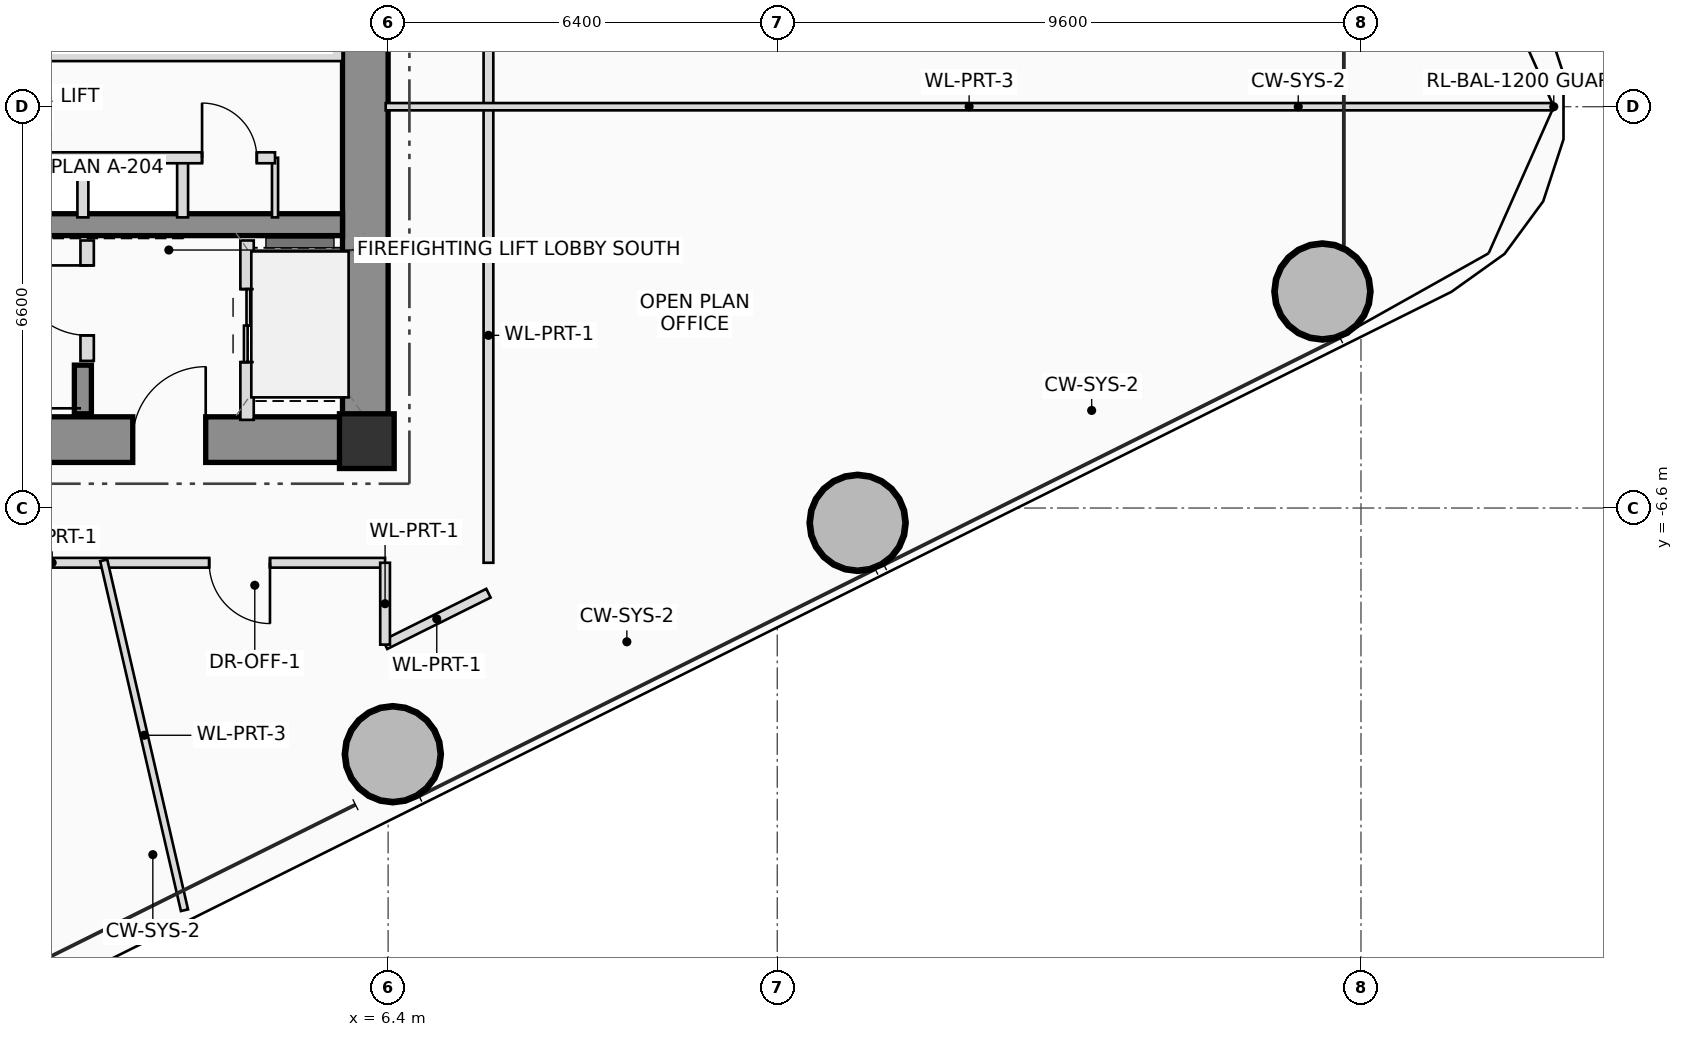
"""IFC4 building model, lengths in metres.
Left out: names, types, materials, properties, quantities, classifications, styles, units other than length and angle.
Written with IfcOpenShell. Run it as: python <this file> out.ifc"""

import sys

from ifc_helpers import new_model, si_unit, direction, frame, frame_2d, origin, origin_2d, place, context, subcontext, project, spatial, rectangle, hollow_circle, extrude, source, transform, mapped, element, fill, save


model = new_model("IFC4")
c1 = context("Model", 3, precision=1e-05, world=origin(), true_north=direction((0.0, 1.0)))
c2 = subcontext(c1, "Body", "Model", "MODEL_VIEW")
j1 = project(units=[si_unit("LENGTHUNIT", "METRE"), si_unit("PLANEANGLEUNIT", "RADIAN")], contexts=[c1])
p1 = place(None, origin())
s1 = spatial("IfcSite", under=j1, at=p1, CompositionType="ELEMENT")
p2 = place(p1, origin())
s2 = spatial("IfcBuilding", under=s1, at=p2, CompositionType="ELEMENT")
p3 = place(p2, frame((0.0, 0.0, 23.8)))
s3 = spatial("IfcBuildingStorey", under=s2, at=p3, CompositionType="ELEMENT", Elevation=23.8)
m1 = source(origin(), c2, "Body", "SweptSolid", [
    extrude(rectangle(XDim=0.9, YDim=0.9, at=origin_2d()), origin(), (0.0, 0.0, 1.0), 3.7),
])
p4 = place(p3, frame((6.05, -5.5, 0.0), z_axis=(0.0, 0.0, 1.0), x_axis=(1.0, 0.0, 0.0)))
e1 = element("IfcColumn", 1, at=p4, inside=s3, PredefinedType="COLUMN", context=c2, shape_type="MappedRepresentation", body=[
    mapped(m1, transform((0.0, 0.0, 0.0), scale=1.0)),
])
p5 = place(p3, frame((-6.4, -5.475, 0.0), z_axis=(0.0, 0.0, 1.0), x_axis=(1.0, 0.0, 0.0)))
e2 = element("IfcWall", 2, at=p5, inside=s3, PredefinedType="SHEAR", context=c2, shape_type="SweptSolid", body=[
    extrude(rectangle(XDim=12.8, YDim=0.75, at=frame_2d((6.4, 0.0))), origin(), (0.0, 0.0, 1.0), 3.7),
])
p6 = place(p5, frame((8.6, 0.0, 0.0)))
e3 = element("IfcOpeningElement", 3, at=p6, cuts=e2, PredefinedType="OPENING", context=c2, shape_type="SweptSolid", body=[
    extrude(rectangle(XDim=1.2, YDim=2.2, at=frame_2d((0.6, 1.1))), frame((0.0, 0.385, 0.0), z_axis=(0.0, -1.0, 0.0), x_axis=(1.0, 0.0, 0.0)), (0.0, 0.0, 1.0), 0.77),
])
p7 = place(p3, frame((6.025, -5.1, 0.0), z_axis=(0.0, 0.0, 1.0), x_axis=(0.0, 1.0, 0.0)))
e4 = element("IfcWall", 4, at=p7, inside=s3, PredefinedType="SHEAR", context=c2, shape_type="SweptSolid", body=[
    extrude(rectangle(XDim=10.2, YDim=0.75, at=frame_2d((5.1, 0.0))), origin(), (0.0, 0.0, 1.0), 3.7),
])
p8 = place(p3, frame((-5.65, -1.94, 0.0), z_axis=(0.0, 0.0, 1.0), x_axis=(1.0, 0.0, 0.0)))
e5 = element("IfcWall", 5, at=p8, inside=s3, PredefinedType="SHEAR", context=c2, shape_type="SweptSolid", body=[
    extrude(rectangle(XDim=11.3, YDim=0.36, at=frame_2d((5.65, 0.0))), origin(), (0.0, 0.0, 1.0), 3.7),
])
p9 = place(p3, frame((1.38, -5.05, 0.0), z_axis=(0.0, 0.0, 1.0), x_axis=(0.0, 1.0, 0.0)))
e6 = element("IfcWall", 6, at=p9, inside=s3, PredefinedType="SHEAR", context=c2, shape_type="SweptSolid", body=[
    extrude(rectangle(XDim=0.8, YDim=0.28, at=frame_2d((0.4, 0.0))), origin(), (0.0, 0.0, 1.0), 3.7),
])
m2 = source(origin(), c2, "Body", "SweptSolid", [
    extrude(hollow_circle(Radius=0.8, WallThickness=0.055, at=origin_2d()), origin(), (0.0, 0.0, 1.0), 3.7),
])
for number, where, z_axis, x_axis in (
    (7, (6.477, -10.648, 0.0), (0.0, 0.0, 1.0), (1.0, 0.0, 0.0)),
    (8, (14.122, -6.844, 0.0), (0.0, 0.0, 1.0), (1.0, 0.0, 0.0)),
    (9, (21.766, -3.039, 0.0), (0.0, 0.0, 1.0), (1.0, 0.0, 0.0)),
):
    element("IfcColumn", number, at=place(p3, frame(where, z_axis=z_axis, x_axis=x_axis)), inside=s3, PredefinedType="COLUMN", context=c2, shape_type="MappedRepresentation", body=[
        mapped(m2, transform((0.0, 0.0, 0.0), scale=1.0)),
    ])
p10 = place(p3, frame((1.45, -4.18, 0.0), z_axis=(0.0, 0.0, 1.0), x_axis=(0.0, 1.0, 0.0)))
e10 = element("IfcWall", 10, at=p10, inside=s3, PredefinedType="PLUMBINGWALL", context=c2, shape_type="SweptSolid", body=[
    extrude(rectangle(XDim=1.98, YDim=0.22, at=frame_2d((0.99, 0.0))), origin(), (0.0, 0.0, 1.0), 3.495),
])
p11 = place(p10, frame((0.42, 0.0, 0.0)))
e11 = element("IfcOpeningElement", 11, at=p11, cuts=e10, PredefinedType="OPENING", context=c2, shape_type="SweptSolid", body=[
    extrude(rectangle(XDim=1.15, YDim=2.15, at=frame_2d((0.575, 1.075))), frame((0.0, 0.12, 0.0), z_axis=(0.0, -1.0, 0.0), x_axis=(1.0, 0.0, 0.0)), (0.0, 0.0, 1.0), 0.24),
])
p12 = place(p3, frame((4.08, -5.15, 0.0), z_axis=(0.0, 0.0, 1.0), x_axis=(0.0, 1.0, 0.0)))
e12 = element("IfcWall", 12, at=p12, inside=s3, PredefinedType="PLUMBINGWALL", context=c2, shape_type="SweptSolid", body=[
    extrude(rectangle(XDim=2.95, YDim=0.22, at=frame_2d((1.475, 0.0))), origin(), (0.0, 0.0, 1.0), 3.495),
])
p13 = place(p12, frame((0.95, 0.0, 0.0)))
e13 = element("IfcOpeningElement", 13, at=p13, cuts=e12, PredefinedType="OPENING", context=c2, shape_type="SweptSolid", body=[
    extrude(rectangle(XDim=1.2, YDim=2.25, at=frame_2d((0.6, 1.125))), frame((0.0, 0.12, 0.0), z_axis=(0.0, -1.0, 0.0), x_axis=(1.0, 0.0, 0.0)), (0.0, 0.0, 1.0), 0.24),
])
for number, where, z_axis, x_axis in (
    (14, (1.38, 0.84, 0.0), (0.0, 0.0, 1.0), (0.0, 1.0, 0.0)),
    (15, (1.38, -1.82, 0.0), (0.0, 0.0, 1.0), (0.0, 1.0, 0.0)),
    (16, (3.02, 0.84, 0.0), (0.0, 0.0, 1.0), (0.0, 1.0, 0.0)),
    (17, (4.38, 0.84, 0.0), (0.0, 0.0, 1.0), (0.0, 1.0, 0.0)),
    (18, (3.02, -1.82, 0.0), (0.0, 0.0, 1.0), (0.0, 1.0, 0.0)),
):
    element("IfcWall", number, at=place(p3, frame(where, z_axis=z_axis, x_axis=x_axis)), inside=s3, PredefinedType="PLUMBINGWALL", context=c2, shape_type="SweptSolid", body=[
        extrude(rectangle(XDim=0.98, YDim=0.18, at=frame_2d((0.49, 0.0))), origin(), (0.0, 0.0, 1.0), 3.495),
    ])
p14 = place(p3, frame((4.54, -1.82, 0.0), z_axis=(0.0, 0.0, 1.0), x_axis=(0.0, 1.0, 0.0)))
e19 = element("IfcWall", 19, at=p14, inside=s3, PredefinedType="PARTITIONING", context=c2, shape_type="SweptSolid", body=[
    extrude(rectangle(XDim=0.98, YDim=0.1, at=frame_2d((0.49, 0.0))), origin(), (0.0, 0.0, 1.0), 3.495),
])
p15 = place(p3, frame((-5.68, 0.84, 0.0), z_axis=(0.0, 0.0, 1.0), x_axis=(1.0, 0.0, 0.0)))
e20 = element("IfcWall", 20, at=p15, inside=s3, PredefinedType="PLUMBINGWALL", context=c2, shape_type="SweptSolid", body=[
    extrude(rectangle(XDim=11.33, YDim=0.18, at=frame_2d((5.665, 0.0))), origin(), (0.0, 0.0, 1.0), 3.495),
])
p16 = place(p15, frame((0.43, 0.0, 0.0)))
e21 = element("IfcOpeningElement", 21, at=p16, cuts=e20, PredefinedType="OPENING", context=c2, shape_type="SweptSolid", body=[
    extrude(rectangle(XDim=1.1, YDim=2.2, at=frame_2d((0.55, 1.1))), frame((0.0, 0.1, 0.0), z_axis=(0.0, -1.0, 0.0), x_axis=(1.0, 0.0, 0.0)), (0.0, 0.0, 1.0), 0.2),
])
p17 = place(p15, frame((2.13, 0.0, 0.0)))
e22 = element("IfcOpeningElement", 22, at=p17, cuts=e20, PredefinedType="OPENING", context=c2, shape_type="SweptSolid", body=[
    extrude(rectangle(XDim=1.1, YDim=2.2, at=frame_2d((0.55, 1.1))), frame((0.0, 0.1, 0.0), z_axis=(0.0, -1.0, 0.0), x_axis=(1.0, 0.0, 0.0)), (0.0, 0.0, 1.0), 0.2),
])
p18 = place(p3, frame((-5.68, -0.84, 0.0), z_axis=(0.0, 0.0, 1.0), x_axis=(1.0, 0.0, 0.0)))
e23 = element("IfcWall", 23, at=p18, inside=s3, PredefinedType="PLUMBINGWALL", context=c2, shape_type="SweptSolid", body=[
    extrude(rectangle(XDim=10.22, YDim=0.18, at=frame_2d((5.11, 0.0))), origin(), (0.0, 0.0, 1.0), 3.495),
])
p19 = place(p18, frame((0.43, 0.0, 0.0)))
e24 = element("IfcOpeningElement", 24, at=p19, cuts=e23, PredefinedType="OPENING", context=c2, shape_type="SweptSolid", body=[
    extrude(rectangle(XDim=1.1, YDim=2.2, at=frame_2d((0.55, 1.1))), frame((0.0, 0.1, 0.0), z_axis=(0.0, -1.0, 0.0), x_axis=(1.0, 0.0, 0.0)), (0.0, 0.0, 1.0), 0.2),
])
p20 = place(p18, frame((2.13, 0.0, 0.0)))
e25 = element("IfcOpeningElement", 25, at=p20, cuts=e23, PredefinedType="OPENING", context=c2, shape_type="SweptSolid", body=[
    extrude(rectangle(XDim=1.1, YDim=2.2, at=frame_2d((0.55, 1.1))), frame((0.0, 0.1, 0.0), z_axis=(0.0, -1.0, 0.0), x_axis=(1.0, 0.0, 0.0)), (0.0, 0.0, 1.0), 0.2),
])
p21 = place(p18, frame((9.02, 0.0, 0.0)))
e26 = element("IfcOpeningElement", 26, at=p21, cuts=e23, PredefinedType="OPENING", context=c2, shape_type="SweptSolid", body=[
    extrude(rectangle(XDim=0.9, YDim=2.05, at=frame_2d((0.45, 1.025))), frame((0.0, 0.1, 0.0), z_axis=(0.0, -1.0, 0.0), x_axis=(1.0, 0.0, 0.0)), (0.0, 0.0, 1.0), 0.2),
])
p22 = place(p3, frame((6.35, -7.5, 0.0), z_axis=(0.0, 0.0, 1.0), x_axis=(-1.0, 0.0, 0.0)))
e27 = element("IfcWall", 27, at=p22, inside=s3, PredefinedType="PARTITIONING", context=c2, shape_type="SweptSolid", body=[
    extrude(rectangle(XDim=12.7, YDim=0.16, at=frame_2d((6.35, 0.0))), origin(), (0.0, 0.0, 1.0), 2.8),
])
p23 = place(p22, frame((1.893, 0.0, 0.0)))
e28 = element("IfcOpeningElement", 28, at=p23, cuts=e27, PredefinedType="OPENING", context=c2, shape_type="SweptSolid", body=[
    extrude(rectangle(XDim=1.0, YDim=2.25, at=frame_2d((0.5, 1.125))), frame((0.0, 0.09, 0.0), z_axis=(0.0, -1.0, 0.0), x_axis=(1.0, 0.0, 0.0)), (0.0, 0.0, 1.0), 0.18),
])
p24 = place(p22, frame((8.057, 0.0, 0.0)))
e29 = element("IfcOpeningElement", 29, at=p24, cuts=e27, PredefinedType="OPENING", context=c2, shape_type="SweptSolid", body=[
    extrude(rectangle(XDim=1.0, YDim=2.25, at=frame_2d((0.5, 1.125))), frame((0.0, 0.09, 0.0), z_axis=(0.0, -1.0, 0.0), x_axis=(1.0, 0.0, 0.0)), (0.0, 0.0, 1.0), 0.18),
])
for number, where, z_axis, x_axis in (
    (30, (8.05, 7.5, 0.0), (0.0, 0.0, 1.0), (0.0, -1.0, 0.0)),
    (31, (8.05, -0.02, 0.0), (0.0, 0.0, 1.0), (0.0, -1.0, 0.0)),
):
    element("IfcWall", number, at=place(p3, frame(where, z_axis=z_axis, x_axis=x_axis)), inside=s3, PredefinedType="PARTITIONING", context=c2, shape_type="SweptSolid", body=[
        extrude(rectangle(XDim=7.48, YDim=0.16, at=frame_2d((3.74, 0.0))), origin(), (0.0, 0.0, 1.0), 2.8),
    ])
p25 = place(p3, frame((8.05, -8.0, 0.0), z_axis=(0.0, 0.0, 1.0), x_axis=(-0.895274181873, -0.445515588136, 0.0)))
e32 = element("IfcWall", 32, at=p25, inside=s3, PredefinedType="PARTITIONING", context=c2, shape_type="SweptSolid", body=[
    extrude(rectangle(XDim=1.899, YDim=0.16, at=frame_2d((0.949, 0.0))), origin(), (0.0, 0.0, 1.0), 2.8),
])
p26 = place(p3, frame((6.35, -8.846, 0.0), z_axis=(0.0, 0.0, 1.0), x_axis=(0.0, 1.0, 0.0)))
e33 = element("IfcWall", 33, at=p26, inside=s3, PredefinedType="PARTITIONING", context=c2, shape_type="SweptSolid", body=[
    extrude(rectangle(XDim=1.346, YDim=0.16, at=frame_2d((0.673, 0.0))), origin(), (0.0, 0.0, 1.0), 2.8),
])
p27 = place(p3, frame((6.36, 0.0, 0.0), z_axis=(0.0, 0.0, 1.0), x_axis=(1.0, 0.0, 0.0)))
e34 = element("IfcWall", 34, at=p27, inside=s3, PredefinedType="PARTITIONING", context=c2, shape_type="SweptSolid", body=[
    extrude(rectangle(XDim=19.191, YDim=0.12, at=frame_2d((9.595, 0.0))), origin(), (0.0, 0.0, 1.0), 2.96),
])
p28 = place(p3, frame((1.722, -7.46, 0.0), z_axis=(0.0, 0.0, 1.0), x_axis=(0.22494706926, -0.974370984806, 0.0)))
e35 = element("IfcWall", 35, at=p28, inside=s3, PredefinedType="PARTITIONING", context=c2, shape_type="SweptSolid", body=[
    extrude(rectangle(XDim=5.905, YDim=0.12, at=frame_2d((2.953, 0.0))), origin(), (0.0, 0.0, 1.0), 2.96),
])
p29 = place(p6, origin())
e36 = element("IfcDoor", 36, at=p29, inside=s3, OperationType="SINGLE_SWING_RIGHT", PredefinedType="DOOR", context=c2, shape_type="SweptSolid", body=[
    extrude(rectangle(XDim=1.2, YDim=2.2, at=frame_2d((0.6, 1.1))), frame((0.0, 0.025, 0.0), z_axis=(0.0, -1.0, 0.0), x_axis=(1.0, 0.0, 0.0)), (0.0, 0.0, 1.0), 0.05),
])
fill(e3, e36)
p30 = place(p11, origin())
e37 = element("IfcDoor", 37, at=p30, inside=s3, OperationType="SINGLE_SWING_RIGHT", PredefinedType="DOOR", context=c2, shape_type="SweptSolid", body=[
    extrude(rectangle(XDim=1.15, YDim=2.15, at=frame_2d((0.575, 1.075))), frame((0.0, 0.025, 0.0), z_axis=(0.0, -1.0, 0.0), x_axis=(1.0, 0.0, 0.0)), (0.0, 0.0, 1.0), 0.05),
])
fill(e11, e37)
p31 = place(p13, origin())
e38 = element("IfcDoor", 38, at=p31, inside=s3, OperationType="DOUBLE_DOOR_SLIDING", PredefinedType="DOOR", context=c2, shape_type="SweptSolid", body=[
    extrude(rectangle(XDim=1.2, YDim=2.25, at=frame_2d((0.6, 1.125))), frame((0.0, 0.025, 0.0), z_axis=(0.0, -1.0, 0.0), x_axis=(1.0, 0.0, 0.0)), (0.0, 0.0, 1.0), 0.05),
])
fill(e13, e38)
p32 = place(p21, origin())
e39 = element("IfcDoor", 39, at=p32, inside=s3, OperationType="SINGLE_SWING_LEFT", PredefinedType="DOOR", context=c2, shape_type="SweptSolid", body=[
    extrude(rectangle(XDim=0.9, YDim=2.05, at=frame_2d((0.45, 1.025))), frame((0.0, 0.025, 0.0), z_axis=(0.0, -1.0, 0.0), x_axis=(1.0, 0.0, 0.0)), (0.0, 0.0, 1.0), 0.05),
])
fill(e26, e39)
p33 = place(p23, origin())
e40 = element("IfcDoor", 40, at=p33, inside=s3, OperationType="SINGLE_SWING_LEFT", PredefinedType="DOOR", context=c2, shape_type="SweptSolid", body=[
    extrude(rectangle(XDim=1.0, YDim=2.25, at=frame_2d((0.5, 1.125))), frame((0.0, 0.025, 0.0), z_axis=(0.0, -1.0, 0.0), x_axis=(1.0, 0.0, 0.0)), (0.0, 0.0, 1.0), 0.05),
])
fill(e28, e40)
save(model, sys.argv[1])
